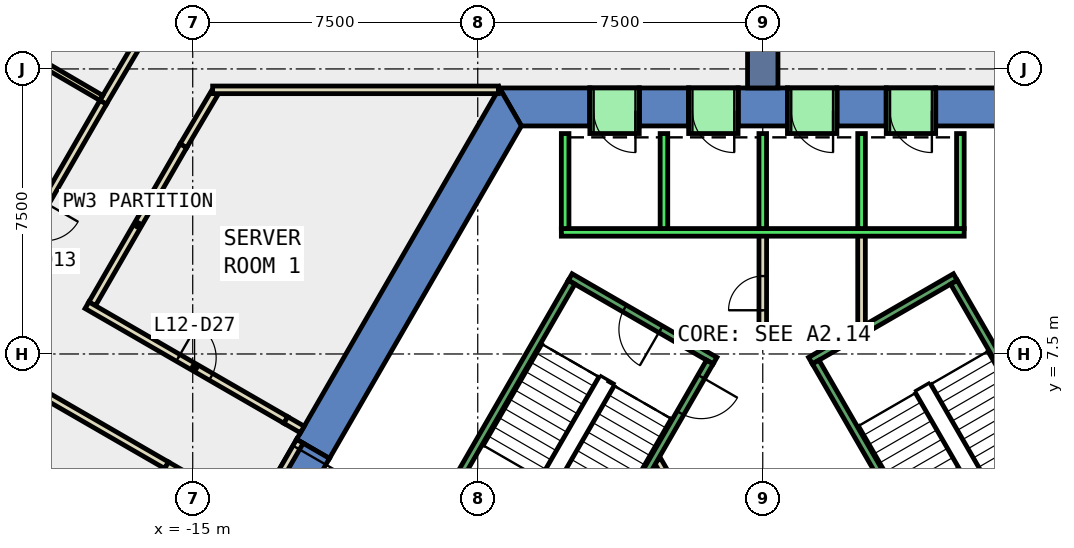
"""IFC4 building model, lengths in metres.
Left out: names, types, materials, properties, quantities, classifications, styles, units other than length and angle.
Written with IfcOpenShell. Run it as: python <this file> out.ifc"""

import sys

from ifc_helpers import new_model, si_unit, direction, frame, frame_2d, origin, place, context, subcontext, project, spatial, polyline, rectangle, outline, extrude, element, fill, save


model = new_model("IFC4")
c1 = context("Model", 3, precision=1e-05, world=origin(), true_north=direction((0.0, 1.0)))
c2 = subcontext(c1, "Body", "Model", "MODEL_VIEW")
j1 = project(units=[si_unit("LENGTHUNIT", "METRE"), si_unit("PLANEANGLEUNIT", "RADIAN")], contexts=[c1])
p1 = place(None, origin())
s1 = spatial("IfcSite", under=j1, at=p1, CompositionType="ELEMENT")
p2 = place(p1, origin())
s2 = spatial("IfcBuilding", under=s1, at=p2, CompositionType="ELEMENT")
p3 = place(p2, frame((0.0, 0.0, 60.2)))
s3 = spatial("IfcBuildingStorey", under=s2, at=p3, CompositionType="ELEMENT", Elevation=60.2)
p4 = place(p3, frame((0.0, 0.0, -0.4)))
e1 = element("IfcWall", 1, at=p4, inside=s3, PredefinedType="SHEAR", context=c2, shape_type="SweptSolid", body=[
    extrude(outline(polyline([(4.55, 14.5), (4.55, 13.5), (6.351, 13.5), (6.928, 14.5), (4.55, 14.5)])), origin(), (0.0, 0.0, 1.0), 4.2),
])
p5 = place(p3, frame((0.0, 0.0, -0.4)))
e2 = element("IfcWall", 2, at=p5, inside=s3, PredefinedType="SHEAR", context=c2, shape_type="SweptSolid", body=[
    extrude(outline(polyline([(1.95, 14.5), (1.95, 13.5), (3.25, 13.5), (3.25, 14.5), (1.95, 14.5)])), origin(), (0.0, 0.0, 1.0), 4.2),
])
p6 = place(p3, frame((0.0, 0.0, -0.4)))
e3 = element("IfcWall", 3, at=p6, inside=s3, PredefinedType="SHEAR", context=c2, shape_type="SweptSolid", body=[
    extrude(outline(polyline([(-0.65, 14.5), (-0.65, 13.5), (0.65, 13.5), (0.65, 14.5), (-0.65, 14.5)])), origin(), (0.0, 0.0, 1.0), 4.2),
])
p7 = place(p3, frame((0.0, 0.0, -0.4)))
e4 = element("IfcWall", 4, at=p7, inside=s3, PredefinedType="SHEAR", context=c2, shape_type="SweptSolid", body=[
    extrude(outline(polyline([(-3.25, 14.5), (-3.25, 13.5), (-1.95, 13.5), (-1.95, 14.5), (-3.25, 14.5)])), origin(), (0.0, 0.0, 1.0), 4.2),
])
p8 = place(p3, frame((0.0, 0.0, -0.4)))
e5 = element("IfcWall", 5, at=p8, inside=s3, PredefinedType="SHEAR", context=c2, shape_type="SweptSolid", body=[
    extrude(outline(polyline([(-4.55, 13.5), (-4.55, 14.5), (-6.928, 14.5), (-6.351, 13.5), (-4.55, 13.5)])), origin(), (0.0, 0.0, 1.0), 4.2),
])
p9 = place(p3, frame((0.0, 0.0, 3.6)))
e6 = element("IfcWall", 6, at=p9, inside=s3, PredefinedType="SHEAR", context=c2, shape_type="SweptSolid", body=[
    extrude(outline(polyline([(3.25, 14.5), (3.25, 13.5), (4.55, 13.5), (4.55, 14.5), (3.25, 14.5)])), origin(), (0.0, 0.0, 1.0), 0.2),
])
p10 = place(p3, frame((0.0, 0.0, 3.6)))
e7 = element("IfcWall", 7, at=p10, inside=s3, PredefinedType="SHEAR", context=c2, shape_type="SweptSolid", body=[
    extrude(outline(polyline([(0.65, 14.5), (0.65, 13.5), (1.95, 13.5), (1.95, 14.5), (0.65, 14.5)])), origin(), (0.0, 0.0, 1.0), 0.2),
])
p11 = place(p3, frame((0.0, 0.0, 3.6)))
e8 = element("IfcWall", 8, at=p11, inside=s3, PredefinedType="SHEAR", context=c2, shape_type="SweptSolid", body=[
    extrude(outline(polyline([(-1.95, 14.5), (-1.95, 13.5), (-0.65, 13.5), (-0.65, 14.5), (-1.95, 14.5)])), origin(), (0.0, 0.0, 1.0), 0.2),
])
p12 = place(p3, frame((0.0, 0.0, 3.6)))
e9 = element("IfcWall", 9, at=p12, inside=s3, PredefinedType="SHEAR", context=c2, shape_type="SweptSolid", body=[
    extrude(outline(polyline([(-4.55, 14.5), (-4.55, 13.5), (-3.25, 13.5), (-3.25, 14.5), (-4.55, 14.5)])), origin(), (0.0, 0.0, 1.0), 0.2),
])
p13 = place(p3, frame((0.0, 0.0, -0.4)))
e10 = element("IfcWall", 10, at=p13, inside=s3, PredefinedType="SHEAR", context=c2, shape_type="SweptSolid", body=[
    extrude(outline(polyline([(-12.267, 5.252), (-11.402, 4.752), (-6.351, 13.5), (-6.928, 14.5), (-12.267, 5.252)])), origin(), (0.0, 0.0, 1.0), 4.2),
])
p14 = place(p3, frame((0.0, 0.0, 3.6)))
e11 = element("IfcWall", 11, at=p14, inside=s3, PredefinedType="SHEAR", context=c2, shape_type="SweptSolid", body=[
    extrude(outline(polyline([(-13.267, 3.52), (-12.402, 3.02), (-11.402, 4.752), (-12.267, 5.252), (-13.267, 3.52)])), origin(), (0.0, 0.0, 1.0), 0.2),
])
p15 = place(p3, frame((0.0, 14.5, -0.4), z_axis=(0.0, 0.0, 1.0), x_axis=(0.0, 1.0, 0.0)))
e12 = element("IfcWall", 12, at=p15, inside=s3, PredefinedType="SHEAR", context=c2, shape_type="SweptSolid", body=[
    extrude(rectangle(XDim=9.0, YDim=0.8, at=frame_2d((4.5, 0.0))), origin(), (0.0, 0.0, 1.0), 4.2),
])
p16 = place(p3, frame((-14.427, 14.364, 0.0), z_axis=(0.0, 0.0, 1.0), x_axis=(-0.508509719672, -0.861056249614, 0.0)))
e13 = element("IfcWall", 13, at=p16, inside=s3, PredefinedType="PARTITIONING", context=c2, shape_type="SweptSolid", body=[
    extrude(rectangle(XDim=1.611, YDim=0.2, at=frame_2d((0.805, 0.0))), origin(), (0.0, 0.0, 1.0), 3.8),
])
p17 = place(p3, frame((-15.246, 12.977, 0.0), z_axis=(0.0, 0.0, 1.0), x_axis=(-0.499891203561, -0.866088208327, 0.0)))
e14 = element("IfcWall", 14, at=p17, inside=s3, PredefinedType="PARTITIONING", context=c2, shape_type="SweptSolid", body=[
    extrude(rectangle(XDim=4.801, YDim=0.2, at=frame_2d((2.4, 0.0))), origin(), (0.0, 0.0, 1.0), 3.8),
])
p18 = place(p3, frame((-17.783, 8.783, 0.0), z_axis=(0.0, 0.0, 1.0), x_axis=(0.866041598752, -0.499971948444, 0.0)))
e15 = element("IfcWall", 15, at=p18, inside=s3, PredefinedType="PARTITIONING", context=c2, shape_type="SweptSolid", body=[
    extrude(rectangle(XDim=6.042, YDim=0.2, at=frame_2d((3.021, 0.0))), origin(), (0.0, 0.0, 1.0), 3.8),
])
p19 = place(p18, frame((2.771, 0.0, 0.0)))
e16 = element("IfcOpeningElement", 16, at=p19, cuts=e15, PredefinedType="OPENING", context=c2, shape_type="SweptSolid", body=[
    extrude(rectangle(XDim=1.0, YDim=2.1, at=frame_2d((0.5, 1.05))), frame((0.0, 0.11, 0.0), z_axis=(0.0, -1.0, 0.0), x_axis=(1.0, 0.0, 0.0)), (0.0, 0.0, 1.0), 0.22),
])
p20 = place(p3, frame((-15.687, 4.571, 0.0), z_axis=(0.0, 0.0, 1.0), x_axis=(-0.866044530317, 0.49996687041, 0.0)))
e17 = element("IfcWall", 17, at=p20, inside=s3, PredefinedType="PARTITIONING", context=c2, shape_type="SweptSolid", body=[
    extrude(rectangle(XDim=3.718, YDim=0.2, at=frame_2d((1.859, 0.0))), origin(), (0.0, 0.0, 1.0), 3.8),
])
p21 = place(p3, frame((-17.357, 14.122, 0.0), z_axis=(0.0, 0.0, 1.0), x_axis=(0.508298575594, 0.861180909014, 0.0)))
e18 = element("IfcWall", 18, at=p21, inside=s3, PredefinedType="PARTITIONING", context=c2, shape_type="SweptSolid", body=[
    extrude(rectangle(XDim=7.258, YDim=0.2, at=frame_2d((3.629, 0.0))), origin(), (0.0, 0.0, 1.0), 3.8),
])
p22 = place(p21, frame((3.204, 0.0, 0.0)))
e19 = element("IfcOpeningElement", 19, at=p22, cuts=e18, PredefinedType="OPENING", context=c2, shape_type="SweptSolid", body=[
    extrude(rectangle(XDim=1.0, YDim=2.1, at=frame_2d((0.5, 1.05))), frame((0.0, 0.11, 0.0), z_axis=(0.0, -1.0, 0.0), x_axis=(1.0, 0.0, 0.0)), (0.0, 0.0, 1.0), 0.22),
])
p23 = place(p3, frame((-17.356, 14.122, 0.0), z_axis=(0.0, 0.0, 1.0), x_axis=(-0.499946764175, -0.866056137321, 0.0)))
e20 = element("IfcWall", 20, at=p23, inside=s3, PredefinedType="PARTITIONING", context=c2, shape_type="SweptSolid", body=[
    extrude(rectangle(XDim=7.255, YDim=0.2, at=frame_2d((3.627, 0.0))), origin(), (0.0, 0.0, 1.0), 3.8),
])
p24 = place(p23, frame((3.052, 0.0, 0.0)))
e21 = element("IfcOpeningElement", 21, at=p24, cuts=e20, PredefinedType="OPENING", context=c2, shape_type="SweptSolid", body=[
    extrude(rectangle(XDim=1.0, YDim=2.1, at=frame_2d((0.5, 1.05))), frame((0.0, 0.11, 0.0), z_axis=(0.0, -1.0, 0.0), x_axis=(1.0, 0.0, 0.0)), (0.0, 0.0, 1.0), 0.22),
])
p25 = place(p3, frame((1.88, 7.8, 0.0), z_axis=(0.0, 0.0, 1.0), x_axis=(-1.0, 0.0, 0.0)))
e22 = element("IfcWall", 22, at=p25, inside=s3, PredefinedType="PARTITIONING", context=c2, shape_type="SweptSolid", body=[
    extrude(rectangle(XDim=1.78, YDim=0.2, at=frame_2d((0.89, 0.0))), origin(), (0.0, 0.0, 1.0), 3.8),
])
p26 = place(p3, frame((0.0, 7.7, 0.0), z_axis=(0.0, 0.0, 1.0), x_axis=(0.000325520816, 0.999999947018, 0.0)))
e23 = element("IfcWall", 23, at=p26, inside=s3, PredefinedType="PARTITIONING", context=c2, shape_type="SweptSolid", body=[
    extrude(rectangle(XDim=3.0, YDim=0.2, at=frame_2d((1.5, 0.0))), origin(), (0.0, 0.0, 1.0), 3.8),
])
p27 = place(p26, frame((0.95, 0.0, 0.0)))
e24 = element("IfcOpeningElement", 24, at=p27, cuts=e23, PredefinedType="OPENING", context=c2, shape_type="SweptSolid", body=[
    extrude(rectangle(XDim=0.9, YDim=2.1, at=frame_2d((0.45, 1.05))), frame((0.0, 0.11, 0.0), z_axis=(0.0, -1.0, 0.0), x_axis=(1.0, 0.0, 0.0)), (0.0, 0.0, 1.0), 0.22),
])
p28 = place(p3, frame((2.599, 10.7, 0.0), z_axis=(0.0, 0.0, 1.0), x_axis=(0.000393159002, -0.999999922713, 0.0)))
e25 = element("IfcWall", 25, at=p28, inside=s3, PredefinedType="PARTITIONING", context=c2, shape_type="SweptSolid", body=[
    extrude(rectangle(XDim=2.484, YDim=0.2, at=frame_2d((1.242, 0.0))), origin(), (0.0, 0.0, 1.0), 3.8),
])
p29 = place(p3, frame((-6.957, 14.45, 0.0), z_axis=(0.0, 0.0, 1.0), x_axis=(-1.0, 0.0, 0.0)))
e26 = element("IfcWall", 26, at=p29, inside=s3, PredefinedType="PARTITIONING", context=c2, shape_type="SweptSolid", body=[
    extrude(rectangle(XDim=7.519, YDim=0.2, at=frame_2d((3.76, 0.0))), origin(), (0.0, 0.0, 1.0), 3.8),
])
p30 = place(p3, frame((-2.771, 4.7, 0.0), z_axis=(0.0, 0.0, 1.0), x_axis=(0.499969479948, -0.866043023828, 0.0)))
e27 = element("IfcWall", 27, at=p30, inside=s3, PredefinedType="PARTITIONING", context=c2, shape_type="SweptSolid", body=[
    extrude(rectangle(XDim=4.99, YDim=0.2, at=frame_2d((2.495, 0.0))), origin(), (0.0, 0.0, 1.0), 3.8),
])
p31 = place(p30, frame((1.945, 0.0, 0.0)))
e28 = element("IfcOpeningElement", 28, at=p31, cuts=e27, PredefinedType="OPENING", context=c2, shape_type="SweptSolid", body=[
    extrude(rectangle(XDim=1.0, YDim=2.1, at=frame_2d((0.5, 1.05))), frame((0.0, 0.11, 0.0), z_axis=(0.0, -1.0, 0.0), x_axis=(1.0, 0.0, 0.0)), (0.0, 0.0, 1.0), 0.22),
])
p32 = place(p3, frame((-15.724, 4.534, 0.0), z_axis=(0.0, 0.0, 1.0), x_axis=(0.500195085719, -0.865912741691, 0.0)))
e29 = element("IfcWall", 29, at=p32, inside=s3, PredefinedType="PARTITIONING", context=c2, shape_type="SweptSolid", body=[
    extrude(rectangle(XDim=1.282, YDim=0.2, at=frame_2d((0.641, 0.0))), origin(), (0.0, 0.0, 1.0), 3.8),
])
p33 = place(p3, frame((-17.405, 14.237, 0.0), z_axis=(0.0, 0.0, 1.0), x_axis=(-0.863614048932, 0.504153522736, 0.0)))
e30 = element("IfcWall", 30, at=p33, inside=s3, PredefinedType="PARTITIONING", context=c2, shape_type="SweptSolid", body=[
    extrude(rectangle(XDim=5.48, YDim=0.15, at=frame_2d((2.74, 0.0))), origin(), (0.0, 0.0, 1.0), 3.8),
])
p34 = place(p3, frame((-12.18, 5.202, 0.0), z_axis=(0.0, 0.0, 1.0), x_axis=(-0.50002537861, -0.866010750942, 0.0)))
e31 = element("IfcWall", 31, at=p34, inside=s3, PredefinedType="PARTITIONING", context=c2, shape_type="SweptSolid", body=[
    extrude(rectangle(XDim=2.0, YDim=0.2, at=frame_2d((1.0, 0.0))), origin(), (0.0, 0.0, 1.0), 2.4),
])
p35 = place(p34, frame((0.19, 0.0, 0.0)))
e32 = element("IfcOpeningElement", 32, at=p35, cuts=e31, PredefinedType="OPENING", context=c2, shape_type="SweptSolid", body=[
    extrude(rectangle(XDim=1.8, YDim=2.1, at=frame_2d((0.9, 1.05))), frame((0.0, 0.11, 0.0), z_axis=(0.0, -1.0, 0.0), x_axis=(1.0, 0.0, 0.0)), (0.0, 0.0, 1.0), 0.22),
])
p36 = place(p3, frame((-12.55, 5.762, 0.0), z_axis=(0.0, 0.0, 1.0), x_axis=(0.866071776036, -0.499919672301, 0.0)))
e33 = element("IfcWall", 33, at=p36, inside=s3, PredefinedType="PARTITIONING", context=c2, shape_type="SweptSolid", body=[
    extrude(rectangle(XDim=0.5, YDim=0.2, at=frame_2d((0.25, 0.0))), origin(), (0.0, 0.0, 1.0), 2.4),
])
p37 = place(p3, frame((-13.85, 3.51, 0.0), z_axis=(0.0, 0.0, 1.0), x_axis=(-0.865924890849, 0.500174053114, 0.0)))
e34 = element("IfcWall", 34, at=p37, inside=s3, PredefinedType="PARTITIONING", context=c2, shape_type="SweptSolid", body=[
    extrude(rectangle(XDim=2.121, YDim=0.2, at=frame_2d((1.061, 0.0))), origin(), (0.0, 0.0, 1.0), 3.8),
])
p38 = place(p3, frame((5.3, 10.7, 0.0), z_axis=(0.0, 0.0, 1.0), x_axis=(-1.0, 0.0, 0.0)))
e35 = element("IfcWall", 35, at=p38, inside=s3, PredefinedType="STANDARD", context=c2, shape_type="SweptSolid", body=[
    extrude(rectangle(XDim=10.6, YDim=0.2, at=frame_2d((5.3, 0.0))), origin(), (0.0, 0.0, 1.0), 3.8),
])
for number, where, z_axis, x_axis in (
    (36, (5.2, 10.8, 0.0), (0.0, 0.0, 1.0), (0.0, 1.0, 0.0)),
    (37, (2.6, 10.8, 0.0), (0.0, 0.0, 1.0), (0.0, 1.0, 0.0)),
    (38, (0.0, 10.8, 0.0), (0.0, 0.0, 1.0), (0.0, 1.0, 0.0)),
    (39, (-2.6, 10.8, 0.0), (0.0, 0.0, 1.0), (0.0, 1.0, 0.0)),
    (40, (-5.2, 10.8, 0.0), (0.0, 0.0, 1.0), (0.0, 1.0, 0.0)),
):
    element("IfcWall", number, at=place(p3, frame(where, z_axis=z_axis, x_axis=x_axis)), inside=s3, PredefinedType="STANDARD", context=c2, shape_type="SweptSolid", body=[
        extrude(rectangle(XDim=2.5, YDim=0.2, at=frame_2d((1.25, 0.0))), origin(), (0.0, 0.0, 1.0), 3.8),
    ])
p39 = place(p3, frame((4.55, 13.9, 0.0), z_axis=(0.0, 0.0, 1.0), x_axis=(-1.0, 0.0, 0.0)))
e41 = element("IfcWall", 41, at=p39, inside=s3, PredefinedType="STANDARD", context=c2, shape_type="SweptSolid", body=[
    extrude(rectangle(XDim=1.3, YDim=1.2, at=frame_2d((0.65, 0.0))), origin(), (0.0, 0.0, 1.0), 2.4),
])
p40 = place(p39, frame((0.1, 0.0, 0.0)))
e42 = element("IfcOpeningElement", 42, at=p40, cuts=e41, PredefinedType="OPENING", context=c2, shape_type="SweptSolid", body=[
    extrude(rectangle(XDim=1.1, YDim=2.3, at=frame_2d((0.55, 1.15))), frame((0.0, 0.61, 0.0), z_axis=(0.0, -1.0, 0.0), x_axis=(1.0, 0.0, 0.0)), (0.0, 0.0, 1.0), 1.22),
])
p41 = place(p3, frame((1.95, 13.9, 0.0), z_axis=(0.0, 0.0, 1.0), x_axis=(-1.0, 0.0, 0.0)))
e43 = element("IfcWall", 43, at=p41, inside=s3, PredefinedType="STANDARD", context=c2, shape_type="SweptSolid", body=[
    extrude(rectangle(XDim=1.3, YDim=1.2, at=frame_2d((0.65, 0.0))), origin(), (0.0, 0.0, 1.0), 2.4),
])
p42 = place(p41, frame((0.1, 0.0, 0.0)))
e44 = element("IfcOpeningElement", 44, at=p42, cuts=e43, PredefinedType="OPENING", context=c2, shape_type="SweptSolid", body=[
    extrude(rectangle(XDim=1.1, YDim=2.3, at=frame_2d((0.55, 1.15))), frame((0.0, 0.61, 0.0), z_axis=(0.0, -1.0, 0.0), x_axis=(1.0, 0.0, 0.0)), (0.0, 0.0, 1.0), 1.22),
])
p43 = place(p3, frame((-0.65, 13.9, 0.0), z_axis=(0.0, 0.0, 1.0), x_axis=(-1.0, 0.0, 0.0)))
e45 = element("IfcWall", 45, at=p43, inside=s3, PredefinedType="STANDARD", context=c2, shape_type="SweptSolid", body=[
    extrude(rectangle(XDim=1.3, YDim=1.2, at=frame_2d((0.65, 0.0))), origin(), (0.0, 0.0, 1.0), 2.4),
])
p44 = place(p43, frame((0.1, 0.0, 0.0)))
e46 = element("IfcOpeningElement", 46, at=p44, cuts=e45, PredefinedType="OPENING", context=c2, shape_type="SweptSolid", body=[
    extrude(rectangle(XDim=1.1, YDim=2.3, at=frame_2d((0.55, 1.15))), frame((0.0, 0.61, 0.0), z_axis=(0.0, -1.0, 0.0), x_axis=(1.0, 0.0, 0.0)), (0.0, 0.0, 1.0), 1.22),
])
p45 = place(p3, frame((-3.25, 13.9, 0.0), z_axis=(0.0, 0.0, 1.0), x_axis=(-1.0, 0.0, 0.0)))
e47 = element("IfcWall", 47, at=p45, inside=s3, PredefinedType="STANDARD", context=c2, shape_type="SweptSolid", body=[
    extrude(rectangle(XDim=1.3, YDim=1.2, at=frame_2d((0.65, 0.0))), origin(), (0.0, 0.0, 1.0), 2.4),
])
p46 = place(p45, frame((0.1, 0.0, 0.0)))
e48 = element("IfcOpeningElement", 48, at=p46, cuts=e47, PredefinedType="OPENING", context=c2, shape_type="SweptSolid", body=[
    extrude(rectangle(XDim=1.1, YDim=2.3, at=frame_2d((0.55, 1.15))), frame((0.0, 0.61, 0.0), z_axis=(0.0, -1.0, 0.0), x_axis=(1.0, 0.0, 0.0)), (0.0, 0.0, 1.0), 1.22),
])
p47 = place(p3, frame((1.256, 7.324, 0.0), z_axis=(0.0, 0.0, 1.0), x_axis=(0.866046073146, 0.499964197906, 0.0)))
e49 = element("IfcWall", 49, at=p47, inside=s3, PredefinedType="STANDARD", context=c2, shape_type="SweptSolid", body=[
    extrude(rectangle(XDim=4.4, YDim=0.2, at=frame_2d((2.2, 0.0))), origin(), (0.0, 0.0, 1.0), 3.8),
])
p48 = place(p3, frame((4.843, 1.312, 0.0), z_axis=(0.0, 0.0, 1.0), x_axis=(-0.499963383562, 0.866046543262, 0.0)))
e50 = element("IfcWall", 50, at=p48, inside=s3, PredefinedType="STANDARD", context=c2, shape_type="SweptSolid", body=[
    extrude(rectangle(XDim=6.9, YDim=0.2, at=frame_2d((3.45, 0.0))), origin(), (0.0, 0.0, 1.0), 3.8),
])
p49 = place(p48, frame((0.45, 0.0, 0.0)))
e51 = element("IfcOpeningElement", 51, at=p49, cuts=e50, PredefinedType="OPENING", context=c2, shape_type="SweptSolid", body=[
    extrude(rectangle(XDim=1.1, YDim=2.2, at=frame_2d((0.55, 1.1))), frame((0.0, 0.11, 0.0), z_axis=(0.0, -1.0, 0.0), x_axis=(1.0, 0.0, 0.0)), (0.0, 0.0, 1.0), 0.22),
])
p50 = place(p3, frame((8.48, 3.412, 0.0), z_axis=(0.0, 0.0, 1.0), x_axis=(-0.499978703459, 0.866037698999, 0.0)))
e52 = element("IfcWall", 52, at=p50, inside=s3, PredefinedType="STANDARD", context=c2, shape_type="SweptSolid", body=[
    extrude(rectangle(XDim=6.9, YDim=0.2, at=frame_2d((3.45, 0.0))), origin(), (0.0, 0.0, 1.0), 3.8),
])
p51 = place(p3, frame((-1.256, 7.324, 0.0), z_axis=(0.0, 0.0, 1.0), x_axis=(-0.866046073146, 0.499964197906, 0.0)))
e53 = element("IfcWall", 53, at=p51, inside=s3, PredefinedType="STANDARD", context=c2, shape_type="SweptSolid", body=[
    extrude(rectangle(XDim=4.4, YDim=0.2, at=frame_2d((2.2, 0.0))), origin(), (0.0, 0.0, 1.0), 3.8),
])
p52 = place(p51, frame((1.65, 0.0, 0.0)))
e54 = element("IfcOpeningElement", 54, at=p52, cuts=e53, PredefinedType="OPENING", context=c2, shape_type="SweptSolid", body=[
    extrude(rectangle(XDim=1.1, YDim=2.2, at=frame_2d((0.55, 1.1))), frame((0.0, 0.11, 0.0), z_axis=(0.0, -1.0, 0.0), x_axis=(1.0, 0.0, 0.0)), (0.0, 0.0, 1.0), 0.22),
])
p53 = place(p3, frame((-1.393, 7.288, 0.0), z_axis=(0.0, 0.0, 1.0), x_axis=(-0.499963383562, -0.866046543262, 0.0)))
e55 = element("IfcWall", 55, at=p53, inside=s3, PredefinedType="STANDARD", context=c2, shape_type="SweptSolid", body=[
    extrude(rectangle(XDim=6.9, YDim=0.2, at=frame_2d((3.45, 0.0))), origin(), (0.0, 0.0, 1.0), 3.8),
])
p54 = place(p53, frame((0.45, 0.0, 0.0)))
e56 = element("IfcOpeningElement", 56, at=p54, cuts=e55, PredefinedType="OPENING", context=c2, shape_type="SweptSolid", body=[
    extrude(rectangle(XDim=1.1, YDim=2.2, at=frame_2d((0.55, 1.1))), frame((0.0, 0.11, 0.0), z_axis=(0.0, -1.0, 0.0), x_axis=(1.0, 0.0, 0.0)), (0.0, 0.0, 1.0), 0.22),
])
p55 = place(p3, frame((-5.03, 9.388, 0.0), z_axis=(0.0, 0.0, 1.0), x_axis=(-0.499978703459, -0.866037698999, 0.0)))
e57 = element("IfcWall", 57, at=p55, inside=s3, PredefinedType="STANDARD", context=c2, shape_type="SweptSolid", body=[
    extrude(rectangle(XDim=6.9, YDim=0.2, at=frame_2d((3.45, 0.0))), origin(), (0.0, 0.0, 1.0), 3.8),
])
p56 = place(p19, origin())
e58 = element("IfcDoor", 58, at=p56, inside=s3, OperationType="SINGLE_SWING_LEFT", PredefinedType="DOOR", context=c2, shape_type="SweptSolid", body=[
    extrude(rectangle(XDim=1.0, YDim=2.1, at=frame_2d((0.5, 1.05))), frame((0.0, 0.025, 0.0), z_axis=(0.0, -1.0, 0.0), x_axis=(1.0, 0.0, 0.0)), (0.0, 0.0, 1.0), 0.05),
])
fill(e16, e58)
p57 = place(p27, origin())
e59 = element("IfcDoor", 59, at=p57, inside=s3, OperationType="SINGLE_SWING_RIGHT", PredefinedType="DOOR", context=c2, shape_type="SweptSolid", body=[
    extrude(rectangle(XDim=0.9, YDim=2.1, at=frame_2d((0.45, 1.05))), frame((0.0, 0.025, 0.0), z_axis=(0.0, -1.0, 0.0), x_axis=(1.0, 0.0, 0.0)), (0.0, 0.0, 1.0), 0.05),
])
fill(e24, e59)
p58 = place(p35, origin())
e60 = element("IfcDoor", 60, at=p58, inside=s3, OperationType="DOUBLE_DOOR_SINGLE_SWING", PredefinedType="DOOR", context=c2, shape_type="SweptSolid", body=[
    extrude(rectangle(XDim=1.8, YDim=2.1, at=frame_2d((0.9, 1.05))), frame((0.0, 0.025, 0.0), z_axis=(0.0, -1.0, 0.0), x_axis=(1.0, 0.0, 0.0)), (0.0, 0.0, 1.0), 0.05),
])
fill(e32, e60)
p59 = place(p40, origin())
e61 = element("IfcDoor", 61, at=p59, inside=s3, OperationType="SLIDING_TO_LEFT", PredefinedType="DOOR", context=c2, shape_type="SweptSolid", body=[
    extrude(rectangle(XDim=1.1, YDim=2.3, at=frame_2d((0.55, 1.15))), frame((0.0, 0.025, 0.0), z_axis=(0.0, -1.0, 0.0), x_axis=(1.0, 0.0, 0.0)), (0.0, 0.0, 1.0), 0.05),
])
fill(e42, e61)
p60 = place(p42, origin())
e62 = element("IfcDoor", 62, at=p60, inside=s3, OperationType="SLIDING_TO_LEFT", PredefinedType="DOOR", context=c2, shape_type="SweptSolid", body=[
    extrude(rectangle(XDim=1.1, YDim=2.3, at=frame_2d((0.55, 1.15))), frame((0.0, 0.025, 0.0), z_axis=(0.0, -1.0, 0.0), x_axis=(1.0, 0.0, 0.0)), (0.0, 0.0, 1.0), 0.05),
])
fill(e44, e62)
p61 = place(p44, origin())
e63 = element("IfcDoor", 63, at=p61, inside=s3, OperationType="SLIDING_TO_LEFT", PredefinedType="DOOR", context=c2, shape_type="SweptSolid", body=[
    extrude(rectangle(XDim=1.1, YDim=2.3, at=frame_2d((0.55, 1.15))), frame((0.0, 0.025, 0.0), z_axis=(0.0, -1.0, 0.0), x_axis=(1.0, 0.0, 0.0)), (0.0, 0.0, 1.0), 0.05),
])
fill(e46, e63)
p62 = place(p46, origin())
e64 = element("IfcDoor", 64, at=p62, inside=s3, OperationType="SLIDING_TO_LEFT", PredefinedType="DOOR", context=c2, shape_type="SweptSolid", body=[
    extrude(rectangle(XDim=1.1, YDim=2.3, at=frame_2d((0.55, 1.15))), frame((0.0, 0.025, 0.0), z_axis=(0.0, -1.0, 0.0), x_axis=(1.0, 0.0, 0.0)), (0.0, 0.0, 1.0), 0.05),
])
fill(e48, e64)
p63 = place(p54, origin())
e65 = element("IfcDoor", 65, at=p63, inside=s3, OperationType="SINGLE_SWING_LEFT", PredefinedType="DOOR", context=c2, shape_type="SweptSolid", body=[
    extrude(rectangle(XDim=1.1, YDim=2.2, at=frame_2d((0.55, 1.1))), frame((0.0, 0.025, 0.0), z_axis=(0.0, -1.0, 0.0), x_axis=(1.0, 0.0, 0.0)), (0.0, 0.0, 1.0), 0.05),
])
fill(e56, e65)
p64 = place(p52, origin())
e66 = element("IfcDoor", 66, at=p64, inside=s3, OperationType="SINGLE_SWING_LEFT", PredefinedType="DOOR", context=c2, shape_type="SweptSolid", body=[
    extrude(rectangle(XDim=1.1, YDim=2.2, at=frame_2d((0.55, 1.1))), frame((0.0, 0.025, 0.0), z_axis=(0.0, -1.0, 0.0), x_axis=(1.0, 0.0, 0.0)), (0.0, 0.0, 1.0), 0.05),
])
fill(e54, e66)
save(model, sys.argv[1])
